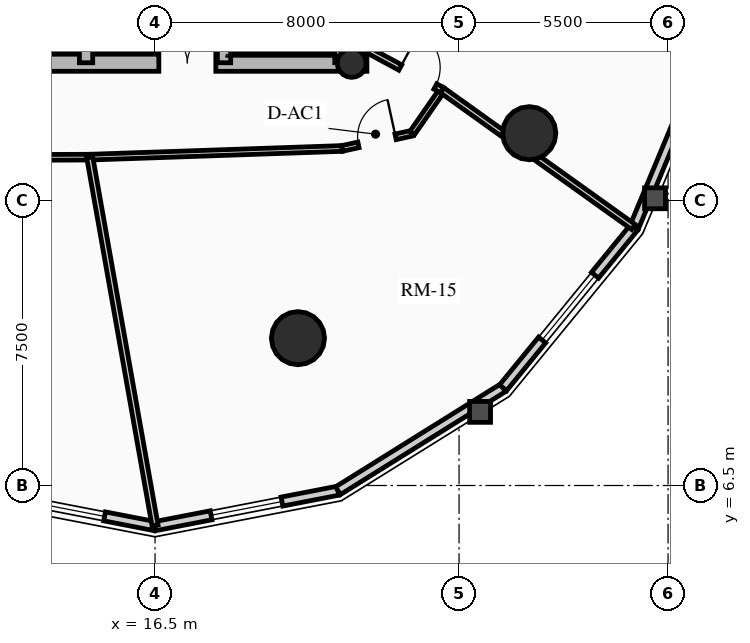
"""IFC4 building model, lengths in metres.
Left out: names, types, materials, properties, quantities, classifications, styles, units other than length and angle.
Written with IfcOpenShell. Run it as: python <this file> out.ifc"""

import sys

from ifc_helpers import new_model, si_unit, direction, frame, frame_2d, origin, origin_2d, place, context, subcontext, project, spatial, rectangle, circle, hollow_circle, extrude, source, transform, mapped, element, fill, save


model = new_model("IFC4")
c1 = context("Model", 3, precision=1e-05, world=origin(), true_north=direction((0.0, 1.0)))
c2 = subcontext(c1, "Body", "Model", "MODEL_VIEW")
j1 = project(units=[si_unit("LENGTHUNIT", "METRE"), si_unit("PLANEANGLEUNIT", "RADIAN")], contexts=[c1])
p1 = place(None, origin())
s1 = spatial("IfcSite", under=j1, at=p1, CompositionType="ELEMENT")
p2 = place(p1, origin())
s2 = spatial("IfcBuilding", under=s1, at=p2, CompositionType="ELEMENT")
p3 = place(p2, frame((0.0, 0.0, 116.71)))
s3 = spatial("IfcBuildingStorey", under=s2, at=p3, CompositionType="ELEMENT", Elevation=116.71)
p4 = place(p3, frame((21.85, 17.4, 0.0), z_axis=(0.0, 0.0, 1.0), x_axis=(0.0, 1.0, 0.0)))
e1 = element("IfcWall", 1, at=p4, inside=s3, PredefinedType="SHEAR", context=c2, shape_type="SweptSolid", body=[
    extrude(rectangle(XDim=14.2, YDim=0.45, at=frame_2d((7.1, 0.0))), origin(), (0.0, 0.0, 1.0), 2.91),
])
p5 = place(p3, frame((11.15, 17.625, 0.0), z_axis=(0.0, 0.0, 1.0), x_axis=(1.0, 0.0, 0.0)))
e2 = element("IfcWall", 2, at=p5, inside=s3, PredefinedType="SHEAR", context=c2, shape_type="SweptSolid", body=[
    extrude(rectangle(XDim=10.7, YDim=0.45, at=frame_2d((5.35, 0.0))), origin(), (0.0, 0.0, 1.0), 2.91),
])
m1 = source(origin(), c2, "Body", "SweptSolid", [
    extrude(rectangle(XDim=1.5, YDim=2.02, at=frame_2d((0.75, 1.01))), frame((0.0, 0.235, 0.0), z_axis=(0.0, -1.0, 0.0), x_axis=(1.0, 0.0, 0.0)), (0.0, 0.0, 1.0), 0.47),
])
p6 = place(p5, frame((5.45, 0.0, 0.0)))
e3 = element("IfcOpeningElement", 3, at=p6, cuts=e2, PredefinedType="OPENING", context=c2, shape_type="MappedRepresentation", body=[
    mapped(m1, transform((0.0, 0.0, 0.0), x_axis=(1.0, 0.0, 0.0), y_axis=(0.0, 1.0, 0.0), z_axis=(0.0, 0.0, 1.0), scale=1.0)),
])
p7 = place(p3, frame((14.685, 17.625, 0.0), z_axis=(0.0, 0.0, 1.0), x_axis=(0.0, 1.0, 0.0)))
e4 = element("IfcWall", 4, at=p7, inside=s3, PredefinedType="SHEAR", context=c2, shape_type="SweptSolid", body=[
    extrude(rectangle(XDim=13.75, YDim=0.35, at=frame_2d((6.875, 0.0))), origin(), (0.0, 0.0, 1.0), 2.91),
])
m2 = source(origin(), c2, "Body", "SweptSolid", [
    extrude(rectangle(XDim=1.1, YDim=2.015, at=frame_2d((0.55, 1.007))), frame((0.0, 0.185, 0.0), z_axis=(0.0, -1.0, 0.0), x_axis=(1.0, 0.0, 0.0)), (0.0, 0.0, 1.0), 0.37),
])
p8 = place(p7, frame((4.875, 0.0, 0.0)))
e5 = element("IfcOpeningElement", 5, at=p8, cuts=e4, PredefinedType="OPENING", context=c2, shape_type="MappedRepresentation", body=[
    mapped(m2, transform((0.0, 0.0, 0.0), x_axis=(1.0, 0.0, 0.0), y_axis=(0.0, 1.0, 0.0), z_axis=(0.0, 0.0, 1.0), scale=1.0)),
])
m3 = source(origin(), c2, "Body", "SweptSolid", [
    extrude(rectangle(XDim=1.15, YDim=2.02, at=frame_2d((0.575, 1.01))), frame((0.0, 0.185, 0.0), z_axis=(0.0, -1.0, 0.0), x_axis=(1.0, 0.0, 0.0)), (0.0, 0.0, 1.0), 0.37),
])
p9 = place(p7, frame((7.295, 0.0, 0.0)))
e6 = element("IfcOpeningElement", 6, at=p9, cuts=e4, PredefinedType="OPENING", context=c2, shape_type="MappedRepresentation", body=[
    mapped(m3, transform((0.0, 0.0, 0.0), x_axis=(1.0, 0.0, 0.0), y_axis=(0.0, 1.0, 0.0), z_axis=(0.0, 0.0, 1.0), scale=1.0)),
])
p10 = place(p3, frame((18.315, 17.625, 0.0), z_axis=(0.0, 0.0, 1.0), x_axis=(0.0, 1.0, 0.0)))
e7 = element("IfcWall", 7, at=p10, inside=s3, PredefinedType="SHEAR", context=c2, shape_type="SweptSolid", body=[
    extrude(rectangle(XDim=13.75, YDim=0.35, at=frame_2d((6.875, 0.0))), origin(), (0.0, 0.0, 1.0), 2.91),
])
p11 = place(p10, frame((10.0, 0.0, 0.0)))
e8 = element("IfcOpeningElement", 8, at=p11, cuts=e7, PredefinedType="OPENING", context=c2, shape_type="MappedRepresentation", body=[
    mapped(m2, transform((0.0, 0.0, 0.0), x_axis=(1.0, 0.0, 0.0), y_axis=(0.0, 1.0, 0.0), z_axis=(0.0, 0.0, 1.0), scale=1.0)),
])
p12 = place(p10, frame((12.0, 0.0, 0.0)))
e9 = element("IfcOpeningElement", 9, at=p12, cuts=e7, PredefinedType="OPENING", context=c2, shape_type="MappedRepresentation", body=[
    mapped(m2, transform((0.0, 0.0, 0.0), x_axis=(1.0, 0.0, 0.0), y_axis=(0.0, 1.0, 0.0), z_axis=(0.0, 0.0, 1.0), scale=1.0)),
])
p13 = place(p10, frame((5.305, 0.0, 0.0)))
e10 = element("IfcOpeningElement", 10, at=p13, cuts=e7, PredefinedType="OPENING", context=c2, shape_type="MappedRepresentation", body=[
    mapped(m3, transform((0.0, 0.0, 0.0), x_axis=(1.0, 0.0, 0.0), y_axis=(0.0, 1.0, 0.0), z_axis=(0.0, 0.0, 1.0), scale=1.0)),
])
p14 = place(p3, frame((21.405, 17.625, 0.0), z_axis=(0.0, 0.0, 1.0), x_axis=(0.0, 1.0, 0.0)))
e11 = element("IfcWall", 11, at=p14, inside=s3, PredefinedType="SHEAR", context=c2, shape_type="SweptSolid", body=[
    extrude(rectangle(XDim=6.72, YDim=0.35, at=frame_2d((3.36, 0.0))), origin(), (0.0, 0.0, 1.0), 2.91),
])
p15 = place(p3, frame((21.675, 17.62, 0.0), z_axis=(0.0, 0.0, 1.0), x_axis=(1.0, 0.0, 0.0)))
e12 = element("IfcColumn", 12, at=p15, inside=s3, PredefinedType="COLUMN", context=c2, shape_type="SweptSolid", body=[
    extrude(hollow_circle(Radius=0.38, WallThickness=0.032, at=origin_2d()), origin(), (0.0, 0.0, 1.0), 2.91),
])
for number, where, z_axis, x_axis in (
    (13, (20.261, 10.377, 0.0), (0.0, 0.0, 1.0), (1.0, 0.0, 0.0)),
    (14, (26.347, 15.771, 0.0), (0.0, 0.0, 1.0), (1.0, 0.0, 0.0)),
):
    element("IfcColumn", number, at=place(p3, frame(where, z_axis=z_axis, x_axis=x_axis)), inside=s3, PredefinedType="USERDEFINED", context=c2, shape_type="SweptSolid", body=[
        extrude(circle(Radius=0.7, at=origin_2d()), origin(), (0.0, 0.0, 1.0), 2.91),
    ])
p16 = place(p3, frame((16.5, 5.43, 0.0), z_axis=(0.0, 0.0, 1.0), x_axis=(-0.981723785992, 0.190311344954, 0.0)))
e15 = element("IfcWall", 15, at=p16, inside=s3, PredefinedType="SOLIDWALL", context=c2, shape_type="SweptSolid", body=[
    extrude(rectangle(XDim=4.904, YDim=0.24, at=frame_2d((2.452, 0.0))), origin(), (0.0, 0.0, 1.0), 2.179),
])
m4 = source(origin(), c2, "Body", "SweptSolid", [
    extrude(rectangle(XDim=2.2, YDim=1.35, at=frame_2d((1.1, 0.675))), frame((0.0, 0.13, 0.0), z_axis=(0.0, -1.0, 0.0), x_axis=(1.0, 0.0, 0.0)), (0.0, 0.0, 1.0), 0.26),
])
p17 = place(p16, frame((1.352, 0.0, 0.65)))
e16 = element("IfcOpeningElement", 16, at=p17, cuts=e15, PredefinedType="OPENING", context=c2, shape_type="MappedRepresentation", body=[
    mapped(m4, transform((0.0, 0.0, 0.0), x_axis=(1.0, 0.0, 0.0), y_axis=(0.0, 1.0, 0.0), z_axis=(0.0, 0.0, 1.0), scale=1.0)),
])
p18 = place(p3, frame((21.315, 6.363, 0.0), z_axis=(0.0, 0.0, 1.0), x_axis=(-0.981723785992, -0.190311344954, 0.0)))
e17 = element("IfcWall", 17, at=p18, inside=s3, PredefinedType="SOLIDWALL", context=c2, shape_type="SweptSolid", body=[
    extrude(rectangle(XDim=4.904, YDim=0.24, at=frame_2d((2.452, 0.0))), origin(), (0.0, 0.0, 1.0), 2.179),
])
m5 = source(origin(), c2, "Body", "SweptSolid", [
    extrude(rectangle(XDim=1.9, YDim=1.35, at=frame_2d((0.95, 0.675))), frame((0.0, 0.13, 0.0), z_axis=(0.0, -1.0, 0.0), x_axis=(1.0, 0.0, 0.0)), (0.0, 0.0, 1.0), 0.26),
])
p19 = place(p18, frame((1.502, 0.0, 0.65)))
e18 = element("IfcOpeningElement", 18, at=p19, cuts=e17, PredefinedType="OPENING", context=c2, shape_type="MappedRepresentation", body=[
    mapped(m5, transform((0.0, 0.0, 0.0), x_axis=(1.0, 0.0, 0.0), y_axis=(0.0, 1.0, 0.0), z_axis=(0.0, 0.0, 1.0), scale=1.0)),
])
p20 = place(p3, frame((25.658, 9.072, 0.0), z_axis=(0.0, 0.0, 1.0), x_axis=(-0.848520380187, -0.529162701263, 0.0)))
e19 = element("IfcWall", 19, at=p20, inside=s3, PredefinedType="SOLIDWALL", context=c2, shape_type="SweptSolid", body=[
    extrude(rectangle(XDim=5.119, YDim=0.24, at=frame_2d((2.56, 0.0))), origin(), (0.0, 0.0, 1.0), 2.179),
])
p21 = place(p3, frame((29.105, 13.291, 0.0), z_axis=(0.0, 0.0, 1.0), x_axis=(-0.632700781152, -0.77439635945, 0.0)))
e20 = element("IfcWall", 20, at=p21, inside=s3, PredefinedType="SOLIDWALL", context=c2, shape_type="SweptSolid", body=[
    extrude(rectangle(XDim=5.448, YDim=0.24, at=frame_2d((2.724, 0.0))), origin(), (0.0, 0.0, 1.0), 2.179),
])
p22 = place(p21, frame((1.624, 0.0, 0.65)))
e21 = element("IfcOpeningElement", 21, at=p22, cuts=e20, PredefinedType="OPENING", context=c2, shape_type="MappedRepresentation", body=[
    mapped(m4, transform((0.0, 0.0, 0.0), x_axis=(1.0, 0.0, 0.0), y_axis=(0.0, 1.0, 0.0), z_axis=(0.0, 0.0, 1.0), scale=1.0)),
])
p23 = place(p3, frame((31.318, 18.607, 0.0), z_axis=(0.0, 0.0, 1.0), x_axis=(-0.384344417632, -0.923189779317, 0.0)))
e22 = element("IfcWall", 22, at=p23, inside=s3, PredefinedType="SOLIDWALL", context=c2, shape_type="SweptSolid", body=[
    extrude(rectangle(XDim=5.758, YDim=0.24, at=frame_2d((2.879, 0.0))), origin(), (0.0, 0.0, 1.0), 2.179),
])
p24 = place(p3, frame((11.46, 15.129, 0.0), z_axis=(0.0, 0.0, 1.0), x_axis=(0.999993513287, 0.003601858435, 0.0)))
e23 = element("IfcWall", 23, at=p24, inside=s3, PredefinedType="PARTITIONING", context=c2, shape_type="SweptSolid", body=[
    extrude(rectangle(XDim=3.321, YDim=0.15, at=frame_2d((1.661, 0.0))), origin(), (0.0, 0.0, 1.0), 2.225),
])
p25 = place(p3, frame((14.781, 15.141, 0.0), z_axis=(0.0, 0.0, 1.0), x_axis=(0.999407918707, 0.034406569513, 0.0)))
e24 = element("IfcWall", 24, at=p25, inside=s3, PredefinedType="PARTITIONING", context=c2, shape_type="SweptSolid", body=[
    extrude(rectangle(XDim=6.642, YDim=0.15, at=frame_2d((3.321, 0.0))), origin(), (0.0, 0.0, 1.0), 2.225),
])
p26 = place(p3, frame((21.419, 15.369, 0.0), z_axis=(0.0, 0.0, 1.0), x_axis=(0.977192701953, 0.212354475464, 0.0)))
e25 = element("IfcWall", 25, at=p26, inside=s3, PredefinedType="PARTITIONING", context=c2, shape_type="SweptSolid", body=[
    extrude(rectangle(XDim=1.888, YDim=0.15, at=frame_2d((0.944, 0.0))), origin(), (0.0, 0.0, 1.0), 2.225),
])
m6 = source(origin(), c2, "Body", "SweptSolid", [
    extrude(rectangle(XDim=1.0, YDim=2.015, at=frame_2d((0.5, 1.007))), frame((0.0, 0.085, 0.0), z_axis=(0.0, -1.0, 0.0), x_axis=(1.0, 0.0, 0.0)), (0.0, 0.0, 1.0), 0.17),
])
p27 = place(p26, frame((0.444, 0.0, 0.0)))
e26 = element("IfcOpeningElement", 26, at=p27, cuts=e25, PredefinedType="OPENING", context=c2, shape_type="MappedRepresentation", body=[
    mapped(m6, transform((0.0, 0.0, 0.0), x_axis=(1.0, 0.0, 0.0), y_axis=(0.0, 1.0, 0.0), z_axis=(0.0, 0.0, 1.0), scale=1.0)),
])
p28 = place(p3, frame((23.263, 15.77, 0.0), z_axis=(0.0, 0.0, 1.0), x_axis=(0.570743456919, 0.821128434768, 0.0)))
e27 = element("IfcWall", 27, at=p28, inside=s3, PredefinedType="PARTITIONING", context=c2, shape_type="SweptSolid", body=[
    extrude(rectangle(XDim=1.382, YDim=0.15, at=frame_2d((0.691, 0.0))), origin(), (0.0, 0.0, 1.0), 2.225),
])
p29 = place(p3, frame((14.781, 15.141, 0.0), z_axis=(0.0, 0.0, 1.0), x_axis=(0.174659805548, -0.984628839881, 0.0)))
e28 = element("IfcWall", 28, at=p29, inside=s3, PredefinedType="PARTITIONING", context=c2, shape_type="SweptSolid", body=[
    extrude(rectangle(XDim=9.842, YDim=0.16, at=frame_2d((4.921, 0.0))), origin(), (0.0, 0.0, 1.0), 2.179),
])
p30 = place(p3, frame((24.052, 16.905, 0.0), z_axis=(0.0, 0.0, 1.0), x_axis=(0.813437670746, -0.581652091727, 0.0)))
e29 = element("IfcWall", 29, at=p30, inside=s3, PredefinedType="PARTITIONING", context=c2, shape_type="SweptSolid", body=[
    extrude(rectangle(XDim=6.192, YDim=0.16, at=frame_2d((3.096, 0.0))), origin(), (0.0, 0.0, 1.0), 2.179),
])
p31 = place(p3, frame((22.075, 17.975, 0.0), z_axis=(0.0, 0.0, 1.0), x_axis=(0.879356383302, -0.476164206073, 0.0)))
e30 = element("IfcWall", 30, at=p31, inside=s3, PredefinedType="PARTITIONING", context=c2, shape_type="SweptSolid", body=[
    extrude(rectangle(XDim=2.248, YDim=0.16, at=frame_2d((1.124, 0.0))), origin(), (0.0, 0.0, 1.0), 2.225),
])
m7 = source(origin(), c2, "Body", "SweptSolid", [
    extrude(rectangle(XDim=1.05, YDim=2.015, at=frame_2d((0.525, 1.007))), frame((0.0, 0.09, 0.0), z_axis=(0.0, -1.0, 0.0), x_axis=(1.0, 0.0, 0.0)), (0.0, 0.0, 1.0), 0.18),
])
p32 = place(p31, frame((0.998, 0.0, 0.0)))
e31 = element("IfcOpeningElement", 31, at=p32, cuts=e30, PredefinedType="OPENING", context=c2, shape_type="MappedRepresentation", body=[
    mapped(m7, transform((0.0, 0.0, 0.0), x_axis=(1.0, 0.0, 0.0), y_axis=(0.0, 1.0, 0.0), z_axis=(0.0, 0.0, 1.0), scale=1.0)),
])
m8 = source(origin(), c2, "Body", "SweptSolid", [
    extrude(rectangle(XDim=2.2, YDim=1.35, at=frame_2d((1.1, 0.675))), frame((0.0, 0.03, 0.0), z_axis=(0.0, -1.0, 0.0), x_axis=(1.0, 0.0, 0.0)), (0.0, 0.0, 1.0), 0.06),
])
p33 = place(p17, origin())
e32 = element("IfcWindow", 32, at=p33, inside=s3, PartitioningType="DOUBLE_PANEL_VERTICAL", PredefinedType="WINDOW", context=c2, shape_type="MappedRepresentation", body=[
    mapped(m8, transform((0.0, 0.0, 0.0), x_axis=(1.0, 0.0, 0.0), y_axis=(0.0, 1.0, 0.0), z_axis=(0.0, 0.0, 1.0), scale=1.0)),
])
fill(e16, e32)
m9 = source(origin(), c2, "Body", "SweptSolid", [
    extrude(rectangle(XDim=1.9, YDim=1.35, at=frame_2d((0.95, 0.675))), frame((0.0, 0.03, 0.0), z_axis=(0.0, -1.0, 0.0), x_axis=(1.0, 0.0, 0.0)), (0.0, 0.0, 1.0), 0.06),
])
p34 = place(p19, origin())
e33 = element("IfcWindow", 33, at=p34, inside=s3, PartitioningType="DOUBLE_PANEL_VERTICAL", PredefinedType="WINDOW", context=c2, shape_type="MappedRepresentation", body=[
    mapped(m9, transform((0.0, 0.0, 0.0), x_axis=(1.0, 0.0, 0.0), y_axis=(0.0, 1.0, 0.0), z_axis=(0.0, 0.0, 1.0), scale=1.0)),
])
fill(e18, e33)
p35 = place(p22, origin())
e34 = element("IfcWindow", 34, at=p35, inside=s3, PartitioningType="DOUBLE_PANEL_VERTICAL", PredefinedType="WINDOW", context=c2, shape_type="MappedRepresentation", body=[
    mapped(m8, transform((0.0, 0.0, 0.0), x_axis=(1.0, 0.0, 0.0), y_axis=(0.0, 1.0, 0.0), z_axis=(0.0, 0.0, 1.0), scale=1.0)),
])
fill(e21, e34)
m10 = source(origin(), c2, "Body", "SweptSolid", [
    extrude(rectangle(XDim=1.5, YDim=2.02, at=frame_2d((0.75, 1.01))), frame((0.0, 0.025, 0.0), z_axis=(0.0, -1.0, 0.0), x_axis=(1.0, 0.0, 0.0)), (0.0, 0.0, 1.0), 0.05),
])
p36 = place(p6, origin())
e35 = element("IfcDoor", 35, at=p36, inside=s3, OperationType="DOUBLE_DOOR_SINGLE_SWING", PredefinedType="DOOR", context=c2, shape_type="MappedRepresentation", body=[
    mapped(m10, transform((0.0, 0.0, 0.0), x_axis=(1.0, 0.0, 0.0), y_axis=(0.0, 1.0, 0.0), z_axis=(0.0, 0.0, 1.0), scale=1.0)),
])
fill(e3, e35)
m11 = source(origin(), c2, "Body", "SweptSolid", [
    extrude(rectangle(XDim=1.05, YDim=2.015, at=frame_2d((0.525, 1.007))), frame((0.0, 0.025, 0.0), z_axis=(0.0, -1.0, 0.0), x_axis=(1.0, 0.0, 0.0)), (0.0, 0.0, 1.0), 0.05),
])
p37 = place(p32, origin())
e36 = element("IfcDoor", 36, at=p37, inside=s3, OperationType="SINGLE_SWING_LEFT", PredefinedType="DOOR", context=c2, shape_type="MappedRepresentation", body=[
    mapped(m11, transform((0.0, 0.0, 0.0), x_axis=(1.0, 0.0, 0.0), y_axis=(0.0, 1.0, 0.0), z_axis=(0.0, 0.0, 1.0), scale=1.0)),
])
fill(e31, e36)
m12 = source(origin(), c2, "Body", "SweptSolid", [
    extrude(rectangle(XDim=1.0, YDim=2.015, at=frame_2d((0.5, 1.007))), frame((0.0, 0.025, 0.0), z_axis=(0.0, -1.0, 0.0), x_axis=(1.0, 0.0, 0.0)), (0.0, 0.0, 1.0), 0.05),
])
p38 = place(p27, origin())
e37 = element("IfcDoor", 37, at=p38, inside=s3, OperationType="SINGLE_SWING_RIGHT", PredefinedType="DOOR", context=c2, shape_type="MappedRepresentation", body=[
    mapped(m12, transform((0.0, 0.0, 0.0), x_axis=(1.0, 0.0, 0.0), y_axis=(0.0, 1.0, 0.0), z_axis=(0.0, 0.0, 1.0), scale=1.0)),
])
fill(e26, e37)
save(model, sys.argv[1])
